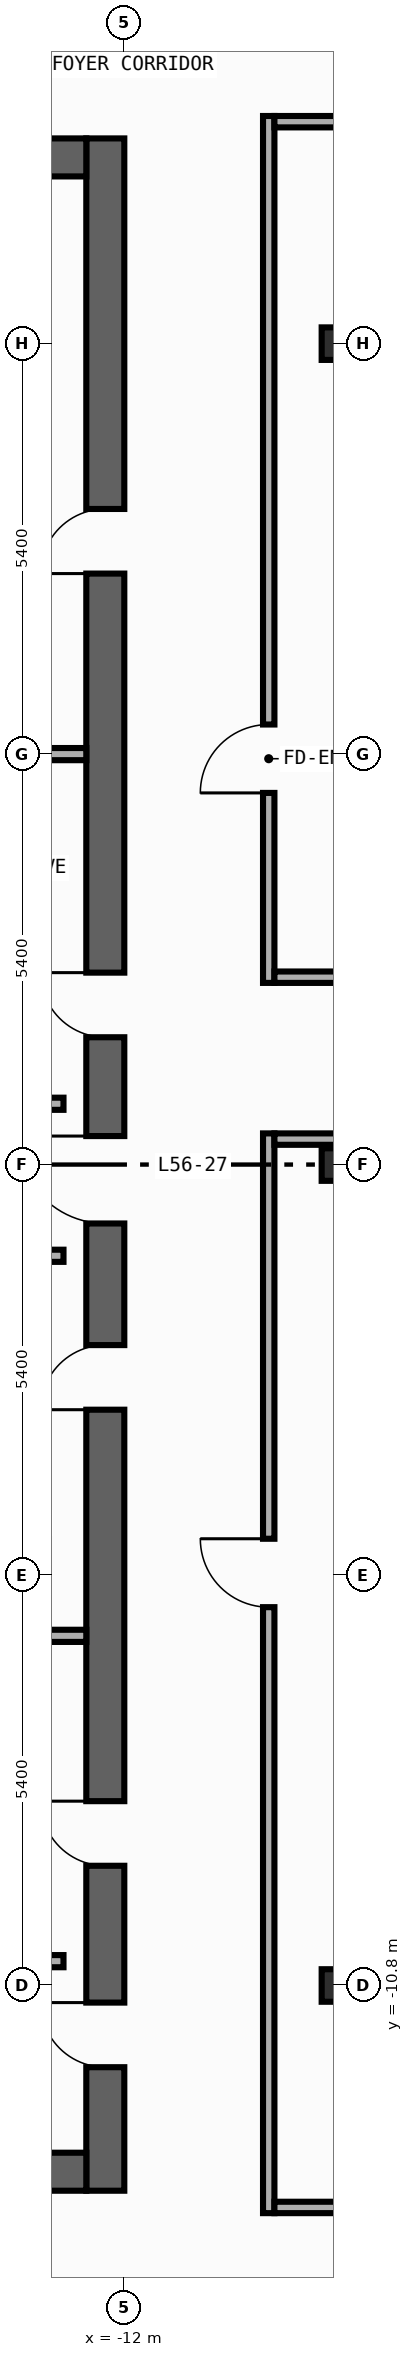
"""IFC4 building model, lengths in metres.
Left out: names, types, materials, properties, quantities, classifications, styles, units other than length and angle.
Written with IfcOpenShell. Run it as: python <this file> out.ifc"""

import sys

from ifc_helpers import new_model, si_unit, direction, frame, frame_2d, origin, origin_2d, place, context, subcontext, project, spatial, rectangle, i_section, extrude, element, fill, save


model = new_model("IFC4")
c1 = context("Model", 3, precision=1e-05, world=origin(), true_north=direction((0.0, 1.0)))
c2 = subcontext(c1, "Body", "Model", "MODEL_VIEW")
j1 = project(units=[si_unit("LENGTHUNIT", "METRE"), si_unit("PLANEANGLEUNIT", "RADIAN")], contexts=[c1])
p1 = place(None, origin())
s1 = spatial("IfcSite", under=j1, at=p1, CompositionType="ELEMENT")
p2 = place(p1, origin())
s2 = spatial("IfcBuilding", under=s1, at=p2, CompositionType="ELEMENT")
p3 = place(p2, frame((0.0, 0.0, 240.4)))
s3 = spatial("IfcBuildingStorey", under=s2, at=p3, CompositionType="ELEMENT", Elevation=240.4)
p4 = place(p3, frame((-12.25, -13.5, 0.0), z_axis=(0.0, 0.0, 1.0), x_axis=(0.0, 1.0, 0.0)))
e1 = element("IfcWall", 1, at=p4, inside=s3, PredefinedType="SHEAR", context=c2, shape_type="SweptSolid", body=[
    extrude(rectangle(XDim=27.0, YDim=0.5, at=frame_2d((13.5, 0.0))), origin(), (0.0, 0.0, 1.0), 3.34),
])
p5 = place(p4, frame((15.175, 0.0, 0.0)))
e2 = element("IfcOpeningElement", 2, at=p5, cuts=e1, PredefinedType="OPENING", context=c2, shape_type="SweptSolid", body=[
    extrude(rectangle(XDim=0.85, YDim=2.1, at=frame_2d((0.425, 1.05))), frame((0.0, 0.26, 0.0), z_axis=(0.0, -1.0, 0.0), x_axis=(1.0, 0.0, 0.0)), (0.0, 0.0, 1.0), 0.52),
])
p6 = place(p4, frame((21.275, 0.0, 0.0)))
e3 = element("IfcOpeningElement", 3, at=p6, cuts=e1, PredefinedType="OPENING", context=c2, shape_type="SweptSolid", body=[
    extrude(rectangle(XDim=0.85, YDim=2.1, at=frame_2d((0.425, 1.05))), frame((0.0, 0.26, 0.0), z_axis=(0.0, -1.0, 0.0), x_axis=(1.0, 0.0, 0.0)), (0.0, 0.0, 1.0), 0.52),
])
p7 = place(p4, frame((4.275, 0.0, 0.0)))
e4 = element("IfcOpeningElement", 4, at=p7, cuts=e1, PredefinedType="OPENING", context=c2, shape_type="SweptSolid", body=[
    extrude(rectangle(XDim=0.85, YDim=2.1, at=frame_2d((0.425, 1.05))), frame((0.0, 0.26, 0.0), z_axis=(0.0, -1.0, 0.0), x_axis=(1.0, 0.0, 0.0)), (0.0, 0.0, 1.0), 0.52),
])
p8 = place(p4, frame((10.275, 0.0, 0.0)))
e5 = element("IfcOpeningElement", 5, at=p8, cuts=e1, PredefinedType="OPENING", context=c2, shape_type="SweptSolid", body=[
    extrude(rectangle(XDim=0.85, YDim=2.1, at=frame_2d((0.425, 1.05))), frame((0.0, 0.26, 0.0), z_axis=(0.0, -1.0, 0.0), x_axis=(1.0, 0.0, 0.0)), (0.0, 0.0, 1.0), 0.52),
])
p9 = place(p4, frame((12.725, 0.0, 0.0)))
e6 = element("IfcOpeningElement", 6, at=p9, cuts=e1, PredefinedType="OPENING", context=c2, shape_type="SweptSolid", body=[
    extrude(rectangle(XDim=1.15, YDim=2.2, at=frame_2d((0.575, 1.1))), frame((0.0, 0.26, 0.0), z_axis=(0.0, -1.0, 0.0), x_axis=(1.0, 0.0, 0.0)), (0.0, 0.0, 1.0), 0.52),
])
p10 = place(p4, frame((1.625, 0.0, 0.0)))
e7 = element("IfcOpeningElement", 7, at=p10, cuts=e1, PredefinedType="OPENING", context=c2, shape_type="SweptSolid", body=[
    extrude(rectangle(XDim=0.85, YDim=2.1, at=frame_2d((0.425, 1.05))), frame((0.0, 0.26, 0.0), z_axis=(0.0, -1.0, 0.0), x_axis=(1.0, 0.0, 0.0)), (0.0, 0.0, 1.0), 0.52),
])
for number, where, z_axis, x_axis in (
    (8, (-19.9, -13.25, 0.0), (0.0, 0.0, 1.0), (1.0, 0.0, 0.0)),
    (9, (-19.9, 13.25, 0.0), (0.0, 0.0, 1.0), (1.0, 0.0, 0.0)),
):
    element("IfcWall", number, at=place(p3, frame(where, z_axis=z_axis, x_axis=x_axis)), inside=s3, PredefinedType="SHEAR", context=c2, shape_type="SweptSolid", body=[
        extrude(rectangle(XDim=7.4, YDim=0.5, at=frame_2d((3.7, 0.0))), origin(), (0.0, 0.0, 1.0), 3.34),
    ])
for number, where, z_axis, x_axis in (
    (10, (-9.2, -10.8, 0.0), (0.0, 0.0, 1.0), (1.0, 0.0, 0.0)),
    (11, (-9.2, 0.0, 0.0), (0.0, 0.0, 1.0), (1.0, 0.0, 0.0)),
    (12, (-9.2, 10.8, 0.0), (0.0, 0.0, 1.0), (1.0, 0.0, 0.0)),
):
    element("IfcColumn", number, at=place(p3, frame(where, z_axis=z_axis, x_axis=x_axis)), inside=s3, PredefinedType="COLUMN", context=c2, shape_type="SweptSolid", body=[
        extrude(i_section(OverallWidth=0.407, OverallDepth=0.428, WebThickness=0.02, FlangeThickness=0.035, FilletRadius=0.022, at=origin_2d()), origin(), (0.0, 0.0, 1.0), 3.6),
    ])
for number, where, z_axis, x_axis in (
    (13, (-15.4, 0.8, 0.0), (0.0, 0.0, 1.0), (1.0, 0.0, 0.0)),
    (14, (-15.4, -1.2, 0.0), (0.0, 0.0, 1.0), (1.0, 0.0, 0.0)),
    (15, (-15.4, -10.48, 0.0), (0.0, 0.0, 1.0), (1.0, 0.0, 0.0)),
):
    element("IfcWall", number, at=place(p3, frame(where, z_axis=z_axis, x_axis=x_axis)), inside=s3, PredefinedType="STANDARD", context=c2, shape_type="SweptSolid", body=[
        extrude(rectangle(XDim=2.6, YDim=0.16, at=frame_2d((1.3, 0.0))), origin(), (0.0, 0.0, 1.0), 3.34),
    ])
for number, where, z_axis, x_axis in (
    (16, (-15.4, 5.4, 0.0), (0.0, 0.0, 1.0), (1.0, 0.0, 0.0)),
    (17, (-15.4, -6.2, 0.0), (0.0, 0.0, 1.0), (1.0, 0.0, 0.0)),
):
    element("IfcWall", number, at=place(p3, frame(where, z_axis=z_axis, x_axis=x_axis)), inside=s3, PredefinedType="PARTITIONING", context=c2, shape_type="SweptSolid", body=[
        extrude(rectangle(XDim=2.9, YDim=0.16, at=frame_2d((1.45, 0.0))), origin(), (0.0, 0.0, 1.0), 3.34),
    ])
p11 = place(p3, frame((-10.1, 2.39, 0.0), z_axis=(0.0, 0.0, 1.0), x_axis=(0.0, 1.0, 0.0)))
e18 = element("IfcWall", 18, at=p11, inside=s3, PredefinedType="PARTITIONING", context=c2, shape_type="SweptSolid", body=[
    extrude(rectangle(XDim=11.405, YDim=0.15, at=frame_2d((5.703, 0.0))), origin(), (0.0, 0.0, 1.0), 3.34),
])
p12 = place(p11, frame((2.5, 0.0, 0.0)))
e19 = element("IfcOpeningElement", 19, at=p12, cuts=e18, PredefinedType="OPENING", context=c2, shape_type="SweptSolid", body=[
    extrude(rectangle(XDim=0.9, YDim=2.15, at=frame_2d((0.45, 1.075))), frame((0.0, 0.085, 0.0), z_axis=(0.0, -1.0, 0.0), x_axis=(1.0, 0.0, 0.0)), (0.0, 0.0, 1.0), 0.17),
])
p13 = place(p3, frame((-10.1, -13.795, 0.0), z_axis=(0.0, 0.0, 1.0), x_axis=(0.0, 1.0, 0.0)))
e20 = element("IfcWall", 20, at=p13, inside=s3, PredefinedType="PARTITIONING", context=c2, shape_type="SweptSolid", body=[
    extrude(rectangle(XDim=14.205, YDim=0.15, at=frame_2d((7.103, 0.0))), origin(), (0.0, 0.0, 1.0), 3.34),
])
p14 = place(p13, frame((7.972, 0.0, 0.0)))
e21 = element("IfcOpeningElement", 21, at=p14, cuts=e20, PredefinedType="OPENING", context=c2, shape_type="SweptSolid", body=[
    extrude(rectangle(XDim=0.9, YDim=2.15, at=frame_2d((0.45, 1.075))), frame((0.0, 0.085, 0.0), z_axis=(0.0, -1.0, 0.0), x_axis=(1.0, 0.0, 0.0)), (0.0, 0.0, 1.0), 0.17),
])
p15 = place(p3, frame((-10.025, 2.465, 0.0), z_axis=(0.0, 0.0, 1.0), x_axis=(1.0, 0.0, 0.0)))
e22 = element("IfcWall", 22, at=p15, inside=s3, PredefinedType="PARTITIONING", context=c2, shape_type="SweptSolid", body=[
    extrude(rectangle(XDim=10.855, YDim=0.15, at=frame_2d((5.427, 0.0))), origin(), (0.0, 0.0, 1.0), 3.34),
])
p16 = place(p15, frame((9.495, 0.0, 0.0)))
e23 = element("IfcOpeningElement", 23, at=p16, cuts=e22, PredefinedType="OPENING", context=c2, shape_type="SweptSolid", body=[
    extrude(rectangle(XDim=0.9, YDim=2.15, at=frame_2d((0.45, 1.075))), frame((0.0, 0.085, 0.0), z_axis=(0.0, -1.0, 0.0), x_axis=(1.0, 0.0, 0.0)), (0.0, 0.0, 1.0), 0.17),
])
p17 = place(p3, frame((-10.025, 0.335, 0.0), z_axis=(0.0, 0.0, 1.0), x_axis=(1.0, 0.0, 0.0)))
e24 = element("IfcWall", 24, at=p17, inside=s3, PredefinedType="PARTITIONING", context=c2, shape_type="SweptSolid", body=[
    extrude(rectangle(XDim=10.835, YDim=0.15, at=frame_2d((5.417, 0.0))), origin(), (0.0, 0.0, 1.0), 2.44),
])
p18 = place(p17, frame((9.475, 0.0, 0.0)))
e25 = element("IfcOpeningElement", 25, at=p18, cuts=e24, PredefinedType="OPENING", context=c2, shape_type="SweptSolid", body=[
    extrude(rectangle(XDim=0.9, YDim=2.15, at=frame_2d((0.45, 1.075))), frame((0.0, 0.085, 0.0), z_axis=(0.0, -1.0, 0.0), x_axis=(1.0, 0.0, 0.0)), (0.0, 0.0, 1.0), 0.17),
])
p19 = place(p3, frame((-10.025, 13.72, 0.0), z_axis=(0.0, 0.0, 1.0), x_axis=(1.0, 0.0, 0.0)))
e26 = element("IfcWall", 26, at=p19, inside=s3, PredefinedType="PARTITIONING", context=c2, shape_type="SweptSolid", body=[
    extrude(rectangle(XDim=10.855, YDim=0.15, at=frame_2d((5.427, 0.0))), origin(), (0.0, 0.0, 1.0), 3.34),
])
p20 = place(p19, frame((7.286, 0.0, 0.0)))
e27 = element("IfcOpeningElement", 27, at=p20, cuts=e26, PredefinedType="OPENING", context=c2, shape_type="SweptSolid", body=[
    extrude(rectangle(XDim=0.9, YDim=2.15, at=frame_2d((0.45, 1.075))), frame((0.0, 0.085, 0.0), z_axis=(0.0, -1.0, 0.0), x_axis=(1.0, 0.0, 0.0)), (0.0, 0.0, 1.0), 0.17),
])
p21 = place(p3, frame((-10.025, -13.72, 0.0), z_axis=(0.0, 0.0, 1.0), x_axis=(1.0, 0.0, 0.0)))
e28 = element("IfcWall", 28, at=p21, inside=s3, PredefinedType="PARTITIONING", context=c2, shape_type="SweptSolid", body=[
    extrude(rectangle(XDim=10.685, YDim=0.15, at=frame_2d((5.342, 0.0))), origin(), (0.0, 0.0, 1.0), 3.34),
])
p22 = place(p21, frame((7.31, 0.0, 0.0)))
e29 = element("IfcOpeningElement", 29, at=p22, cuts=e28, PredefinedType="OPENING", context=c2, shape_type="SweptSolid", body=[
    extrude(rectangle(XDim=0.9, YDim=2.15, at=frame_2d((0.45, 1.075))), frame((0.0, 0.085, 0.0), z_axis=(0.0, -1.0, 0.0), x_axis=(1.0, 0.0, 0.0)), (0.0, 0.0, 1.0), 0.17),
])
p23 = place(p5, origin())
e30 = element("IfcDoor", 30, at=p23, inside=s3, OperationType="SINGLE_SWING_RIGHT", PredefinedType="DOOR", context=c2, shape_type="SweptSolid", body=[
    extrude(rectangle(XDim=0.85, YDim=2.1, at=frame_2d((0.425, 1.05))), frame((0.0, 0.025, 0.0), z_axis=(0.0, -1.0, 0.0), x_axis=(1.0, 0.0, 0.0)), (0.0, 0.0, 1.0), 0.05),
])
fill(e2, e30)
p24 = place(p6, origin())
e31 = element("IfcDoor", 31, at=p24, inside=s3, OperationType="SINGLE_SWING_LEFT", PredefinedType="DOOR", context=c2, shape_type="SweptSolid", body=[
    extrude(rectangle(XDim=0.85, YDim=2.1, at=frame_2d((0.425, 1.05))), frame((0.0, 0.025, 0.0), z_axis=(0.0, -1.0, 0.0), x_axis=(1.0, 0.0, 0.0)), (0.0, 0.0, 1.0), 0.05),
])
fill(e3, e31)
p25 = place(p7, origin())
e32 = element("IfcDoor", 32, at=p25, inside=s3, OperationType="SINGLE_SWING_RIGHT", PredefinedType="DOOR", context=c2, shape_type="SweptSolid", body=[
    extrude(rectangle(XDim=0.85, YDim=2.1, at=frame_2d((0.425, 1.05))), frame((0.0, 0.025, 0.0), z_axis=(0.0, -1.0, 0.0), x_axis=(1.0, 0.0, 0.0)), (0.0, 0.0, 1.0), 0.05),
])
fill(e4, e32)
p26 = place(p8, origin())
e33 = element("IfcDoor", 33, at=p26, inside=s3, OperationType="SINGLE_SWING_LEFT", PredefinedType="DOOR", context=c2, shape_type="SweptSolid", body=[
    extrude(rectangle(XDim=0.85, YDim=2.1, at=frame_2d((0.425, 1.05))), frame((0.0, 0.025, 0.0), z_axis=(0.0, -1.0, 0.0), x_axis=(1.0, 0.0, 0.0)), (0.0, 0.0, 1.0), 0.05),
])
fill(e5, e33)
p27 = place(p9, origin())
e34 = element("IfcDoor", 34, at=p27, inside=s3, OperationType="SINGLE_SWING_RIGHT", PredefinedType="DOOR", context=c2, shape_type="SweptSolid", body=[
    extrude(rectangle(XDim=1.15, YDim=2.2, at=frame_2d((0.575, 1.1))), frame((0.0, 0.025, 0.0), z_axis=(0.0, -1.0, 0.0), x_axis=(1.0, 0.0, 0.0)), (0.0, 0.0, 1.0), 0.05),
])
fill(e6, e34)
p28 = place(p10, origin())
e35 = element("IfcDoor", 35, at=p28, inside=s3, OperationType="SINGLE_SWING_RIGHT", PredefinedType="DOOR", context=c2, shape_type="SweptSolid", body=[
    extrude(rectangle(XDim=0.85, YDim=2.1, at=frame_2d((0.425, 1.05))), frame((0.0, 0.025, 0.0), z_axis=(0.0, -1.0, 0.0), x_axis=(1.0, 0.0, 0.0)), (0.0, 0.0, 1.0), 0.05),
])
fill(e7, e35)
p29 = place(p12, origin())
e36 = element("IfcDoor", 36, at=p29, inside=s3, OperationType="SINGLE_SWING_LEFT", PredefinedType="DOOR", context=c2, shape_type="SweptSolid", body=[
    extrude(rectangle(XDim=0.9, YDim=2.15, at=frame_2d((0.45, 1.075))), frame((0.0, 0.025, 0.0), z_axis=(0.0, -1.0, 0.0), x_axis=(1.0, 0.0, 0.0)), (0.0, 0.0, 1.0), 0.05),
])
fill(e19, e36)
p30 = place(p14, origin())
e37 = element("IfcDoor", 37, at=p30, inside=s3, OperationType="SINGLE_SWING_RIGHT", PredefinedType="DOOR", context=c2, shape_type="SweptSolid", body=[
    extrude(rectangle(XDim=0.9, YDim=2.15, at=frame_2d((0.45, 1.075))), frame((0.0, 0.025, 0.0), z_axis=(0.0, -1.0, 0.0), x_axis=(1.0, 0.0, 0.0)), (0.0, 0.0, 1.0), 0.05),
])
fill(e21, e37)
save(model, sys.argv[1])
